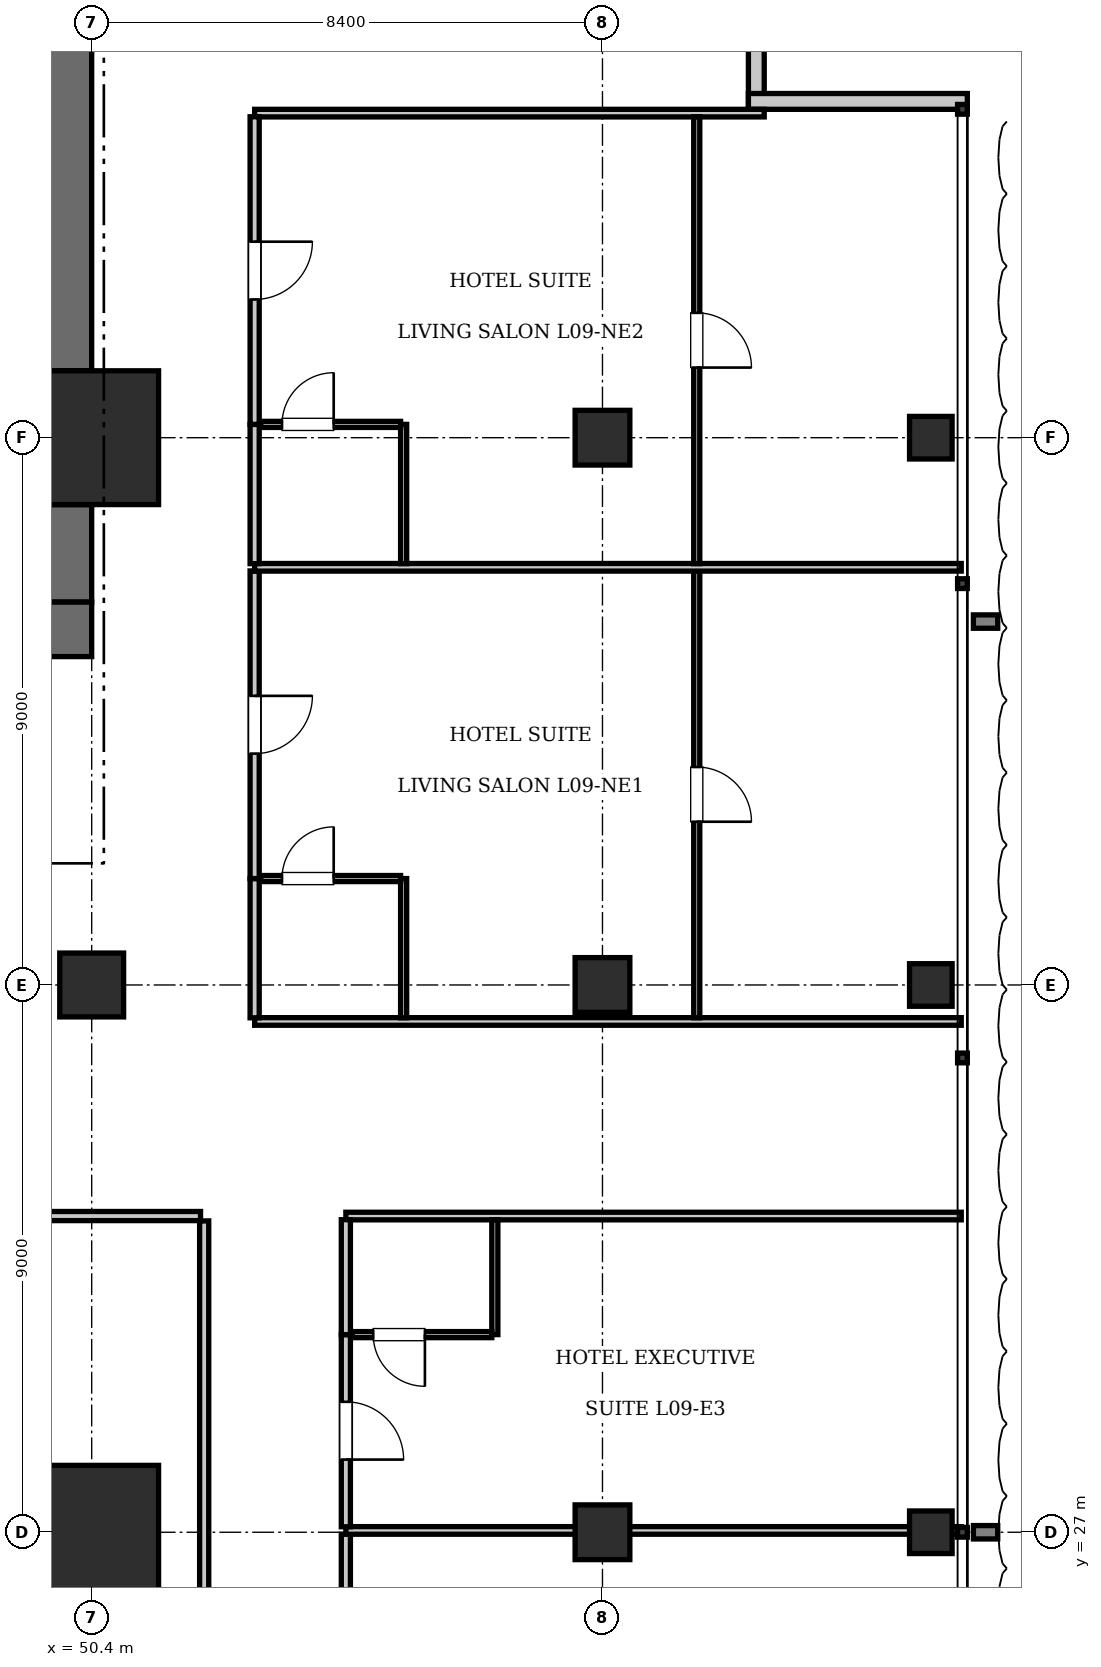
"""IFC4 building model, lengths in metres.
Left out: names, types, materials, properties, quantities, classifications, styles, units other than length and angle.
Written with IfcOpenShell. Run it as: python <this file> out.ifc"""

import sys

from ifc_helpers import new_model, si_unit, direction, frame, frame_2d, origin, origin_2d, place, context, subcontext, project, spatial, rectangle, i_section, extrude, element, fill, save


model = new_model("IFC4")
c1 = context("Model", 3, precision=1e-05, world=origin(), true_north=direction((0.0, 1.0)))
c2 = subcontext(c1, "Body", "Model", "MODEL_VIEW")
j1 = project(units=[si_unit("LENGTHUNIT", "METRE"), si_unit("PLANEANGLEUNIT", "RADIAN")], contexts=[c1])
p1 = place(None, origin())
s1 = spatial("IfcSite", under=j1, at=p1, CompositionType="ELEMENT")
p2 = place(p1, origin())
s2 = spatial("IfcBuilding", under=s1, at=p2, CompositionType="ELEMENT")
p3 = place(p2, frame((0.0, 0.0, 42.35)))
s3 = spatial("IfcBuildingStorey", under=s2, at=p3, CompositionType="ELEMENT", Elevation=42.35)
for number, where, z_axis, x_axis in (
    (1, (50.4, 27.0, 0.0), (0.0, 0.0, 1.0), (1.0, 0.0, 0.0)),
    (2, (50.4, 45.0, 0.0), (0.0, 0.0, 1.0), (1.0, 0.0, 0.0)),
):
    element("IfcColumn", number, at=place(p3, frame(where, z_axis=z_axis, x_axis=x_axis)), inside=s3, PredefinedType="COLUMN", context=c2, shape_type="SweptSolid", body=[
        extrude(rectangle(XDim=2.2, YDim=2.2, at=origin_2d()), origin(), (0.0, 0.0, 1.0), 3.85),
    ])
p4 = place(p3, frame((43.6, 41.85, 0.0), z_axis=(0.0, 0.0, 1.0), x_axis=(1.0, 0.0, 0.0)))
e3 = element("IfcWall", 3, at=p4, inside=s3, PredefinedType="SHEAR", context=c2, shape_type="SweptSolid", body=[
    extrude(rectangle(XDim=6.8, YDim=0.9, at=frame_2d((3.4, 0.0))), origin(), (0.0, 0.0, 1.0), 3.85),
])
p5 = place(p4, frame((3.9, 0.0, 0.0)))
e4 = element("IfcOpeningElement", 4, at=p5, cuts=e3, PredefinedType="OPENING", context=c2, shape_type="SweptSolid", body=[
    extrude(rectangle(XDim=1.15, YDim=2.15, at=frame_2d((0.575, 1.075))), frame((0.0, 0.46, 0.0), z_axis=(0.0, -1.0, 0.0), x_axis=(1.0, 0.0, 0.0)), (0.0, 0.0, 1.0), 0.92),
])
p6 = place(p4, frame((0.55, 0.0, 0.0)))
e5 = element("IfcOpeningElement", 5, at=p6, cuts=e3, PredefinedType="OPENING", context=c2, shape_type="SweptSolid", body=[
    extrude(rectangle(XDim=1.1, YDim=2.2, at=frame_2d((0.55, 1.1))), frame((0.0, 0.46, 0.0), z_axis=(0.0, -1.0, 0.0), x_axis=(1.0, 0.0, 0.0)), (0.0, 0.0, 1.0), 0.92),
])
p7 = place(p3, frame((49.95, 42.3, 0.0), z_axis=(0.0, 0.0, 1.0), x_axis=(0.0, 1.0, 0.0)))
e6 = element("IfcWall", 6, at=p7, inside=s3, PredefinedType="SHEAR", context=c2, shape_type="SweptSolid", body=[
    extrude(rectangle(XDim=1.6, YDim=0.9, at=frame_2d((0.8, 0.0))), origin(), (0.0, 0.0, 1.0), 3.85),
])
p8 = place(p3, frame((49.95, 46.1, 0.0), z_axis=(0.0, 0.0, 1.0), x_axis=(0.0, 1.0, 0.0)))
e7 = element("IfcWall", 7, at=p8, inside=s3, PredefinedType="SHEAR", context=c2, shape_type="SweptSolid", body=[
    extrude(rectangle(XDim=7.0, YDim=0.9, at=frame_2d((3.5, 0.0))), origin(), (0.0, 0.0, 1.0), 3.85),
])
p9 = place(p3, frame((50.4, 36.0, 0.0), z_axis=(0.0, 0.0, 1.0), x_axis=(1.0, 0.0, 0.0)))
e8 = element("IfcColumn", 8, at=p9, inside=s3, PredefinedType="COLUMN", context=c2, shape_type="SweptSolid", body=[
    extrude(rectangle(XDim=1.05, YDim=1.05, at=origin_2d()), origin(), (0.0, 0.0, 1.0), 3.85),
])
for number, where, z_axis, x_axis in (
    (9, (58.8, 27.0, 0.0), (0.0, 0.0, 1.0), (1.0, 0.0, 0.0)),
    (10, (58.8, 36.0, 0.0), (0.0, 0.0, 1.0), (1.0, 0.0, 0.0)),
    (11, (58.8, 45.0, 0.0), (0.0, 0.0, 1.0), (1.0, 0.0, 0.0)),
):
    element("IfcColumn", number, at=place(p3, frame(where, z_axis=z_axis, x_axis=x_axis)), inside=s3, PredefinedType="COLUMN", context=c2, shape_type="SweptSolid", body=[
        extrude(rectangle(XDim=0.9, YDim=0.9, at=origin_2d()), origin(), (0.0, 0.0, 1.0), 3.85),
    ])
for number, where, z_axis, x_axis in (
    (12, (64.2, 27.0, 0.0), (0.0, 0.0, 1.0), (1.0, 0.0, 0.0)),
    (13, (64.2, 36.0, 0.0), (0.0, 0.0, 1.0), (1.0, 0.0, 0.0)),
    (14, (64.2, 45.0, 0.0), (0.0, 0.0, 1.0), (1.0, 0.0, 0.0)),
):
    element("IfcColumn", number, at=place(p3, frame(where, z_axis=z_axis, x_axis=x_axis)), inside=s3, PredefinedType="COLUMN", context=c2, shape_type="SweptSolid", body=[
        extrude(i_section(OverallWidth=0.7, OverallDepth=0.7, WebThickness=0.028, FlangeThickness=0.044, at=origin_2d()), origin(), (0.0, 0.0, 1.0), 3.85),
    ])
for number, where, z_axis, x_axis in (
    (15, (61.33, 54.0, 0.0), (0.0, 0.0, 1.0), (0.0, -1.0, 0.0)),
    (16, (61.2, 50.53, 0.0), (0.0, 0.0, 1.0), (1.0, 0.0, 0.0)),
):
    element("IfcWall", number, at=place(p3, frame(where, z_axis=z_axis, x_axis=x_axis)), inside=s3, PredefinedType="SOLIDWALL", context=c2, shape_type="SweptSolid", body=[
        extrude(rectangle(XDim=3.6, YDim=0.26, at=frame_2d((1.8, 0.0))), origin(), (0.0, 0.0, 1.0), 3.61),
    ])
p10 = place(p3, frame((52.25, 24.58, 0.0), z_axis=(0.0, 0.0, 1.0), x_axis=(0.0, 1.0, 0.0)))
e17 = element("IfcWall", 17, at=p10, inside=s3, PredefinedType="PARTITIONING", context=c2, shape_type="SweptSolid", body=[
    extrude(rectangle(XDim=7.54, YDim=0.15, at=frame_2d((3.77, 0.0))), origin(), (0.0, 0.0, 1.0), 3.61),
])
p11 = place(p3, frame((39.853, 32.2, 0.0), z_axis=(0.0, 0.0, 1.0), x_axis=(1.0, 0.0, 0.0)))
e18 = element("IfcWall", 18, at=p11, inside=s3, PredefinedType="PARTITIONING", context=c2, shape_type="SweptSolid", body=[
    extrude(rectangle(XDim=12.337, YDim=0.15, at=frame_2d((6.168, 0.0))), origin(), (0.0, 0.0, 1.0), 3.61),
])
p12 = place(p11, frame((5.719, 0.0, 0.0)))
e19 = element("IfcOpeningElement", 19, at=p12, cuts=e18, PredefinedType="OPENING", context=c2, shape_type="SweptSolid", body=[
    extrude(rectangle(XDim=0.9, YDim=2.1, at=frame_2d((0.45, 1.05))), frame((0.0, 0.085, 0.0), z_axis=(0.0, -1.0, 0.0), x_axis=(1.0, 0.0, 0.0)), (0.0, 0.0, 1.0), 0.17),
])
p13 = place(p3, frame((54.58, 32.2, 0.0), z_axis=(0.0, 0.0, 1.0), x_axis=(1.0, 0.0, 0.0)))
e20 = element("IfcWall", 20, at=p13, inside=s3, PredefinedType="PARTITIONING", context=c2, shape_type="SweptSolid", body=[
    extrude(rectangle(XDim=10.12, YDim=0.125, at=frame_2d((5.06, 0.0))), origin(), (0.0, 0.0, 1.0), 3.61),
])
p14 = place(p3, frame((54.58, 23.82, 0.0), z_axis=(0.0, 0.0, 1.0), x_axis=(0.0, 1.0, 0.0)))
e21 = element("IfcWall", 21, at=p14, inside=s3, PredefinedType="PARTITIONING", context=c2, shape_type="SweptSolid", body=[
    extrude(rectangle(XDim=3.15, YDim=0.15, at=frame_2d((1.575, 0.0))), origin(), (0.0, 0.0, 1.0), 3.403),
])
p15 = place(p14, frame((1.1, 0.0, 0.0)))
e22 = element("IfcOpeningElement", 22, at=p15, cuts=e21, PredefinedType="OPENING", context=c2, shape_type="SweptSolid", body=[
    extrude(rectangle(XDim=0.95, YDim=2.15, at=frame_2d((0.475, 1.075))), frame((0.0, 0.085, 0.0), z_axis=(0.0, -1.0, 0.0), x_axis=(1.0, 0.0, 0.0)), (0.0, 0.0, 1.0), 0.17),
])
p16 = place(p3, frame((54.58, 27.03, 0.0), z_axis=(0.0, 0.0, 1.0), x_axis=(1.0, 0.0, 0.0)))
e23 = element("IfcWall", 23, at=p16, inside=s3, PredefinedType="PARTITIONING", context=c2, shape_type="SweptSolid", body=[
    extrude(rectangle(XDim=10.12, YDim=0.125, at=frame_2d((5.06, 0.0))), origin(), (0.0, 0.0, 1.0), 2.988),
])
p17 = place(p3, frame((54.58, 27.09, 0.0), z_axis=(0.0, 0.0, 1.0), x_axis=(0.0, 1.0, 0.0)))
e24 = element("IfcWall", 24, at=p17, inside=s3, PredefinedType="PARTITIONING", context=c2, shape_type="SweptSolid", body=[
    extrude(rectangle(XDim=3.16, YDim=0.15, at=frame_2d((1.58, 0.0))), origin(), (0.0, 0.0, 1.0), 3.457),
])
p18 = place(p17, frame((1.105, 0.0, 0.0)))
e25 = element("IfcOpeningElement", 25, at=p18, cuts=e24, PredefinedType="OPENING", context=c2, shape_type="SweptSolid", body=[
    extrude(rectangle(XDim=0.95, YDim=2.15, at=frame_2d((0.475, 1.075))), frame((0.0, 0.085, 0.0), z_axis=(0.0, -1.0, 0.0), x_axis=(1.0, 0.0, 0.0)), (0.0, 0.0, 1.0), 0.17),
])
p19 = place(p3, frame((54.58, 30.25, 0.0), z_axis=(0.0, 0.0, 1.0), x_axis=(0.0, 1.0, 0.0)))
e26 = element("IfcWall", 26, at=p19, inside=s3, PredefinedType="PARTITIONING", context=c2, shape_type="SweptSolid", body=[
    extrude(rectangle(XDim=1.89, YDim=0.15, at=frame_2d((0.945, 0.0))), origin(), (0.0, 0.0, 1.0), 3.457),
])
p20 = place(p3, frame((57.03, 30.25, 0.0), z_axis=(0.0, 0.0, 1.0), x_axis=(0.0, 1.0, 0.0)))
e27 = element("IfcWall", 27, at=p20, inside=s3, PredefinedType="PARTITIONING", context=c2, shape_type="SweptSolid", body=[
    extrude(rectangle(XDim=1.89, YDim=0.1, at=frame_2d((0.945, 0.0))), origin(), (0.0, 0.0, 1.0), 3.61),
])
p21 = place(p3, frame((54.68, 30.25, 0.0), z_axis=(0.0, 0.0, 1.0), x_axis=(1.0, 0.0, 0.0)))
e28 = element("IfcWall", 28, at=p21, inside=s3, PredefinedType="PARTITIONING", context=c2, shape_type="SweptSolid", body=[
    extrude(rectangle(XDim=2.3, YDim=0.1, at=frame_2d((1.15, 0.0))), origin(), (0.0, 0.0, 1.0), 3.61),
])
p22 = place(p21, frame((0.35, 0.0, 0.0)))
e29 = element("IfcOpeningElement", 29, at=p22, cuts=e28, PredefinedType="OPENING", context=c2, shape_type="SweptSolid", body=[
    extrude(rectangle(XDim=0.85, YDim=2.1, at=frame_2d((0.425, 1.05))), frame((0.0, 0.06, 0.0), z_axis=(0.0, -1.0, 0.0), x_axis=(1.0, 0.0, 0.0)), (0.0, 0.0, 1.0), 0.12),
])
p23 = place(p3, frame((53.08, 35.4, 0.0), z_axis=(0.0, 0.0, 1.0), x_axis=(1.0, 0.0, 0.0)))
e30 = element("IfcWall", 30, at=p23, inside=s3, PredefinedType="PARTITIONING", context=c2, shape_type="SweptSolid", body=[
    extrude(rectangle(XDim=11.62, YDim=0.125, at=frame_2d((5.81, 0.0))), origin(), (0.0, 0.0, 1.0), 3.61),
])
p24 = place(p3, frame((53.08, 50.337, 0.0), z_axis=(0.0, 0.0, 1.0), x_axis=(1.0, 0.0, 0.0)))
e31 = element("IfcWall", 31, at=p24, inside=s3, PredefinedType="PARTITIONING", context=c2, shape_type="SweptSolid", body=[
    extrude(rectangle(XDim=8.38, YDim=0.125, at=frame_2d((4.19, 0.0))), origin(), (0.0, 0.0, 1.0), 3.61),
])
p25 = place(p3, frame((53.08, 35.46, 0.0), z_axis=(0.0, 0.0, 1.0), x_axis=(0.0, 1.0, 0.0)))
e32 = element("IfcWall", 32, at=p25, inside=s3, PredefinedType="PARTITIONING", context=c2, shape_type="SweptSolid", body=[
    extrude(rectangle(XDim=2.29, YDim=0.15, at=frame_2d((1.145, 0.0))), origin(), (0.0, 0.0, 1.0), 3.61),
])
p26 = place(p3, frame((53.08, 37.75, 0.0), z_axis=(0.0, 0.0, 1.0), x_axis=(0.0, 1.0, 0.0)))
e33 = element("IfcWall", 33, at=p26, inside=s3, PredefinedType="PARTITIONING", context=c2, shape_type="SweptSolid", body=[
    extrude(rectangle(XDim=5.059, YDim=0.15, at=frame_2d((2.529, 0.0))), origin(), (0.0, 0.0, 1.0), 3.61),
])
p27 = place(p26, frame((2.054, 0.0, 0.0)))
e34 = element("IfcOpeningElement", 34, at=p27, cuts=e33, PredefinedType="OPENING", context=c2, shape_type="SweptSolid", body=[
    extrude(rectangle(XDim=0.95, YDim=2.15, at=frame_2d((0.475, 1.075))), frame((0.0, 0.085, 0.0), z_axis=(0.0, -1.0, 0.0), x_axis=(1.0, 0.0, 0.0)), (0.0, 0.0, 1.0), 0.17),
])
p28 = place(p3, frame((55.53, 35.46, 0.0), z_axis=(0.0, 0.0, 1.0), x_axis=(0.0, 1.0, 0.0)))
e35 = element("IfcWall", 35, at=p28, inside=s3, PredefinedType="PARTITIONING", context=c2, shape_type="SweptSolid", body=[
    extrude(rectangle(XDim=2.29, YDim=0.1, at=frame_2d((1.145, 0.0))), origin(), (0.0, 0.0, 1.0), 3.61),
])
p29 = place(p3, frame((53.18, 37.75, 0.0), z_axis=(0.0, 0.0, 1.0), x_axis=(1.0, 0.0, 0.0)))
e36 = element("IfcWall", 36, at=p29, inside=s3, PredefinedType="PARTITIONING", context=c2, shape_type="SweptSolid", body=[
    extrude(rectangle(XDim=2.3, YDim=0.1, at=frame_2d((1.15, 0.0))), origin(), (0.0, 0.0, 1.0), 3.61),
])
p30 = place(p29, frame((0.35, 0.0, 0.0)))
e37 = element("IfcOpeningElement", 37, at=p30, cuts=e36, PredefinedType="OPENING", context=c2, shape_type="SweptSolid", body=[
    extrude(rectangle(XDim=0.85, YDim=2.1, at=frame_2d((0.425, 1.05))), frame((0.0, 0.06, 0.0), z_axis=(0.0, -1.0, 0.0), x_axis=(1.0, 0.0, 0.0)), (0.0, 0.0, 1.0), 0.12),
])
p31 = place(p3, frame((60.35, 35.46, 0.0), z_axis=(0.0, 0.0, 1.0), x_axis=(0.0, 1.0, 0.0)))
e38 = element("IfcWall", 38, at=p31, inside=s3, PredefinedType="PARTITIONING", context=c2, shape_type="SweptSolid", body=[
    extrude(rectangle(XDim=7.349, YDim=0.1, at=frame_2d((3.674, 0.0))), origin(), (0.0, 0.0, 1.0), 3.61),
])
p32 = place(p31, frame((3.224, 0.0, 0.0)))
e39 = element("IfcOpeningElement", 39, at=p32, cuts=e38, PredefinedType="OPENING", context=c2, shape_type="SweptSolid", body=[
    extrude(rectangle(XDim=0.9, YDim=2.1, at=frame_2d((0.45, 1.05))), frame((0.0, 0.06, 0.0), z_axis=(0.0, -1.0, 0.0), x_axis=(1.0, 0.0, 0.0)), (0.0, 0.0, 1.0), 0.12),
])
p33 = place(p3, frame((53.08, 42.869, 0.0), z_axis=(0.0, 0.0, 1.0), x_axis=(1.0, 0.0, 0.0)))
e40 = element("IfcWall", 40, at=p33, inside=s3, PredefinedType="PARTITIONING", context=c2, shape_type="SweptSolid", body=[
    extrude(rectangle(XDim=11.62, YDim=0.125, at=frame_2d((5.81, 0.0))), origin(), (0.0, 0.0, 1.0), 3.61),
])
p34 = place(p3, frame((53.08, 42.929, 0.0), z_axis=(0.0, 0.0, 1.0), x_axis=(0.0, 1.0, 0.0)))
e41 = element("IfcWall", 41, at=p34, inside=s3, PredefinedType="PARTITIONING", context=c2, shape_type="SweptSolid", body=[
    extrude(rectangle(XDim=2.29, YDim=0.15, at=frame_2d((1.145, 0.0))), origin(), (0.0, 0.0, 1.0), 3.61),
])
p35 = place(p3, frame((53.08, 45.219, 0.0), z_axis=(0.0, 0.0, 1.0), x_axis=(0.0, 1.0, 0.0)))
e42 = element("IfcWall", 42, at=p35, inside=s3, PredefinedType="PARTITIONING", context=c2, shape_type="SweptSolid", body=[
    extrude(rectangle(XDim=5.059, YDim=0.15, at=frame_2d((2.529, 0.0))), origin(), (0.0, 0.0, 1.0), 3.61),
])
p36 = place(p35, frame((2.054, 0.0, 0.0)))
e43 = element("IfcOpeningElement", 43, at=p36, cuts=e42, PredefinedType="OPENING", context=c2, shape_type="SweptSolid", body=[
    extrude(rectangle(XDim=0.95, YDim=2.15, at=frame_2d((0.475, 1.075))), frame((0.0, 0.085, 0.0), z_axis=(0.0, -1.0, 0.0), x_axis=(1.0, 0.0, 0.0)), (0.0, 0.0, 1.0), 0.17),
])
p37 = place(p3, frame((55.53, 42.929, 0.0), z_axis=(0.0, 0.0, 1.0), x_axis=(0.0, 1.0, 0.0)))
e44 = element("IfcWall", 44, at=p37, inside=s3, PredefinedType="PARTITIONING", context=c2, shape_type="SweptSolid", body=[
    extrude(rectangle(XDim=2.29, YDim=0.1, at=frame_2d((1.145, 0.0))), origin(), (0.0, 0.0, 1.0), 3.61),
])
p38 = place(p3, frame((53.18, 45.219, 0.0), z_axis=(0.0, 0.0, 1.0), x_axis=(1.0, 0.0, 0.0)))
e45 = element("IfcWall", 45, at=p38, inside=s3, PredefinedType="PARTITIONING", context=c2, shape_type="SweptSolid", body=[
    extrude(rectangle(XDim=2.3, YDim=0.1, at=frame_2d((1.15, 0.0))), origin(), (0.0, 0.0, 1.0), 3.61),
])
p39 = place(p38, frame((0.35, 0.0, 0.0)))
e46 = element("IfcOpeningElement", 46, at=p39, cuts=e45, PredefinedType="OPENING", context=c2, shape_type="SweptSolid", body=[
    extrude(rectangle(XDim=0.85, YDim=2.1, at=frame_2d((0.425, 1.05))), frame((0.0, 0.06, 0.0), z_axis=(0.0, -1.0, 0.0), x_axis=(1.0, 0.0, 0.0)), (0.0, 0.0, 1.0), 0.12),
])
p40 = place(p3, frame((60.35, 42.929, 0.0), z_axis=(0.0, 0.0, 1.0), x_axis=(0.0, 1.0, 0.0)))
e47 = element("IfcWall", 47, at=p40, inside=s3, PredefinedType="PARTITIONING", context=c2, shape_type="SweptSolid", body=[
    extrude(rectangle(XDim=7.349, YDim=0.1, at=frame_2d((3.674, 0.0))), origin(), (0.0, 0.0, 1.0), 3.61),
])
p41 = place(p40, frame((3.224, 0.0, 0.0)))
e48 = element("IfcOpeningElement", 48, at=p41, cuts=e47, PredefinedType="OPENING", context=c2, shape_type="SweptSolid", body=[
    extrude(rectangle(XDim=0.9, YDim=2.1, at=frame_2d((0.45, 1.05))), frame((0.0, 0.06, 0.0), z_axis=(0.0, -1.0, 0.0), x_axis=(1.0, 0.0, 0.0)), (0.0, 0.0, 1.0), 0.12),
])
p42 = place(p22, frame((0.85, 0.0, 0.0), z_axis=(0.0, 0.0, 1.0), x_axis=(-1.0, 0.0, 0.0)))
e49 = element("IfcDoor", 49, at=p42, inside=s3, OperationType="SINGLE_SWING_LEFT", PredefinedType="DOOR", context=c2, shape_type="SweptSolid", body=[
    extrude(rectangle(XDim=0.85, YDim=2.1, at=frame_2d((0.425, 1.05))), frame((0.0, 0.025, 0.0), z_axis=(0.0, -1.0, 0.0), x_axis=(1.0, 0.0, 0.0)), (0.0, 0.0, 1.0), 0.05),
])
fill(e29, e49)
p43 = place(p18, frame((0.95, 0.0, 0.0), z_axis=(0.0, 0.0, 1.0), x_axis=(-1.0, 0.0, 0.0)))
e50 = element("IfcDoor", 50, at=p43, inside=s3, OperationType="SINGLE_SWING_RIGHT", PredefinedType="DOOR", context=c2, shape_type="SweptSolid", body=[
    extrude(rectangle(XDim=0.95, YDim=2.15, at=frame_2d((0.475, 1.075))), frame((0.0, 0.025, 0.0), z_axis=(0.0, -1.0, 0.0), x_axis=(1.0, 0.0, 0.0)), (0.0, 0.0, 1.0), 0.05),
])
fill(e25, e50)
p44 = place(p30, origin())
e51 = element("IfcDoor", 51, at=p44, inside=s3, OperationType="SINGLE_SWING_RIGHT", PredefinedType="DOOR", context=c2, shape_type="SweptSolid", body=[
    extrude(rectangle(XDim=0.85, YDim=2.1, at=frame_2d((0.425, 1.05))), frame((0.0, 0.025, 0.0), z_axis=(0.0, -1.0, 0.0), x_axis=(1.0, 0.0, 0.0)), (0.0, 0.0, 1.0), 0.05),
])
fill(e37, e51)
p45 = place(p27, frame((0.95, 0.0, 0.0), z_axis=(0.0, 0.0, 1.0), x_axis=(-1.0, 0.0, 0.0)))
e52 = element("IfcDoor", 52, at=p45, inside=s3, OperationType="SINGLE_SWING_LEFT", PredefinedType="DOOR", context=c2, shape_type="SweptSolid", body=[
    extrude(rectangle(XDim=0.95, YDim=2.15, at=frame_2d((0.475, 1.075))), frame((0.0, 0.025, 0.0), z_axis=(0.0, -1.0, 0.0), x_axis=(1.0, 0.0, 0.0)), (0.0, 0.0, 1.0), 0.05),
])
fill(e34, e52)
p46 = place(p32, frame((0.9, 0.0, 0.0), z_axis=(0.0, 0.0, 1.0), x_axis=(-1.0, 0.0, 0.0)))
e53 = element("IfcDoor", 53, at=p46, inside=s3, OperationType="SINGLE_SWING_RIGHT", PredefinedType="DOOR", context=c2, shape_type="SweptSolid", body=[
    extrude(rectangle(XDim=0.9, YDim=2.1, at=frame_2d((0.45, 1.05))), frame((0.0, 0.025, 0.0), z_axis=(0.0, -1.0, 0.0), x_axis=(1.0, 0.0, 0.0)), (0.0, 0.0, 1.0), 0.05),
])
fill(e39, e53)
p47 = place(p39, origin())
e54 = element("IfcDoor", 54, at=p47, inside=s3, OperationType="SINGLE_SWING_RIGHT", PredefinedType="DOOR", context=c2, shape_type="SweptSolid", body=[
    extrude(rectangle(XDim=0.85, YDim=2.1, at=frame_2d((0.425, 1.05))), frame((0.0, 0.025, 0.0), z_axis=(0.0, -1.0, 0.0), x_axis=(1.0, 0.0, 0.0)), (0.0, 0.0, 1.0), 0.05),
])
fill(e46, e54)
p48 = place(p36, frame((0.95, 0.0, 0.0), z_axis=(0.0, 0.0, 1.0), x_axis=(-1.0, 0.0, 0.0)))
e55 = element("IfcDoor", 55, at=p48, inside=s3, OperationType="SINGLE_SWING_LEFT", PredefinedType="DOOR", context=c2, shape_type="SweptSolid", body=[
    extrude(rectangle(XDim=0.95, YDim=2.15, at=frame_2d((0.475, 1.075))), frame((0.0, 0.025, 0.0), z_axis=(0.0, -1.0, 0.0), x_axis=(1.0, 0.0, 0.0)), (0.0, 0.0, 1.0), 0.05),
])
fill(e43, e55)
p49 = place(p41, frame((0.9, 0.0, 0.0), z_axis=(0.0, 0.0, 1.0), x_axis=(-1.0, 0.0, 0.0)))
e56 = element("IfcDoor", 56, at=p49, inside=s3, OperationType="SINGLE_SWING_RIGHT", PredefinedType="DOOR", context=c2, shape_type="SweptSolid", body=[
    extrude(rectangle(XDim=0.9, YDim=2.1, at=frame_2d((0.45, 1.05))), frame((0.0, 0.025, 0.0), z_axis=(0.0, -1.0, 0.0), x_axis=(1.0, 0.0, 0.0)), (0.0, 0.0, 1.0), 0.05),
])
fill(e48, e56)
save(model, sys.argv[1])
